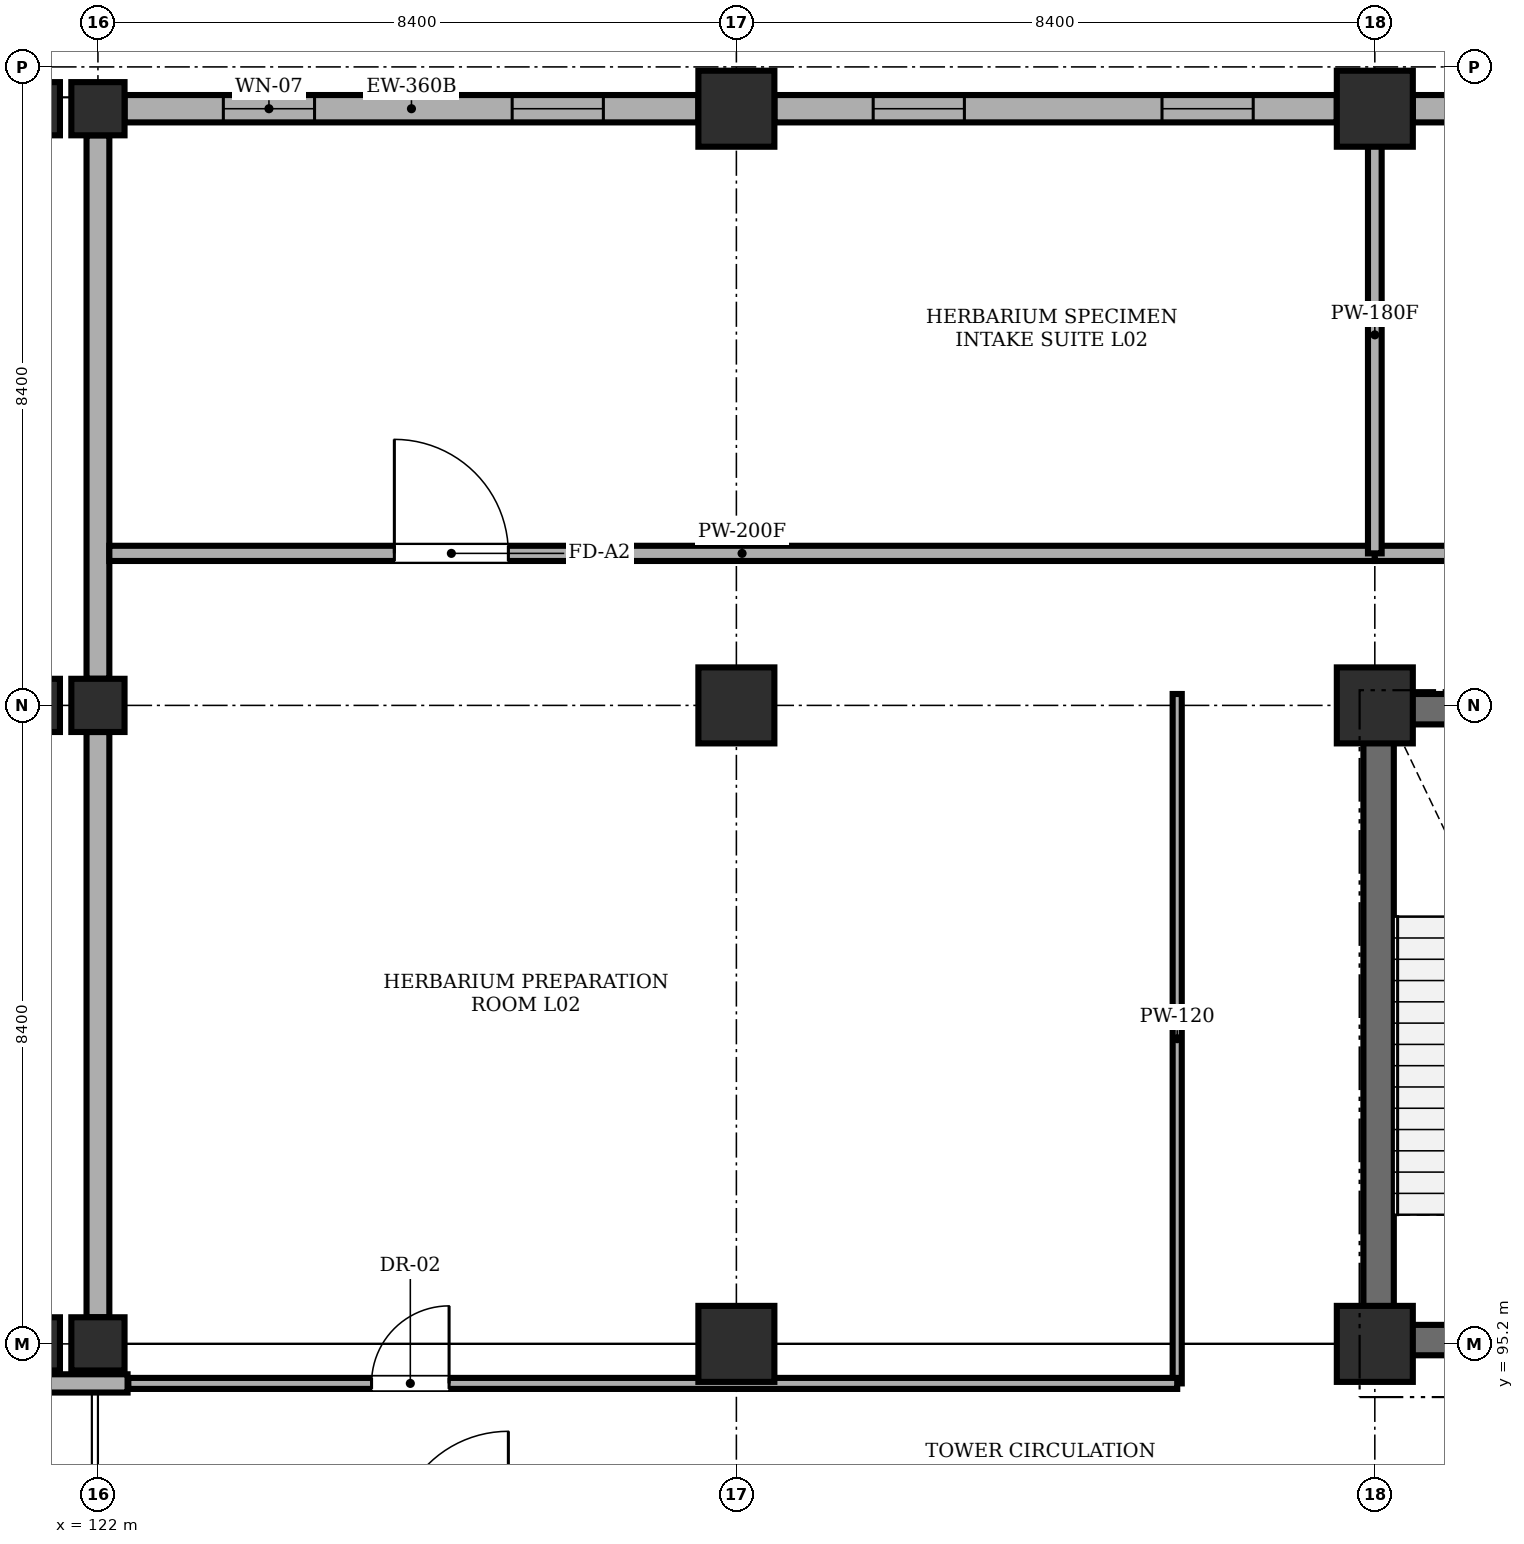
"""IFC4 building model, lengths in metres.
Left out: names, types, materials, properties, quantities, classifications, styles, units other than length and angle.
Written with IfcOpenShell. Run it as: python <this file> out.ifc"""

import sys

from ifc_helpers import new_model, si_unit, direction, frame, frame_2d, origin, origin_2d, place, context, subcontext, project, spatial, rectangle, extrude, element, fill, save


model = new_model("IFC4")
c1 = context("Model", 3, precision=1e-05, world=origin(), true_north=direction((0.0, 1.0)))
c2 = subcontext(c1, "Body", "Model", "MODEL_VIEW")
j1 = project(units=[si_unit("LENGTHUNIT", "METRE"), si_unit("PLANEANGLEUNIT", "RADIAN")], contexts=[c1])
p1 = place(None, origin())
s1 = spatial("IfcSite", under=j1, at=p1, CompositionType="ELEMENT")
p2 = place(p1, origin())
s2 = spatial("IfcBuilding", under=s1, at=p2, CompositionType="ELEMENT")
p3 = place(p2, frame((0.0, 0.0, 5.4)))
s3 = spatial("IfcBuildingStorey", under=s2, at=p3, CompositionType="ELEMENT", Elevation=5.4)
for number, where, z_axis, x_axis in (
    (1, (121.15, 95.2, 0.0), (0.0, 0.0, 1.0), (1.0, 0.0, 0.0)),
    (2, (121.15, 103.6, 0.0), (0.0, 0.0, 1.0), (1.0, 0.0, 0.0)),
    (3, (121.15, 111.45, 0.0), (0.0, 0.0, 1.0), (1.0, 0.0, 0.0)),
    (4, (122.0, 95.2, 0.0), (0.0, 0.0, 1.0), (1.0, 0.0, 0.0)),
    (5, (122.0, 103.6, 0.0), (0.0, 0.0, 1.0), (1.0, 0.0, 0.0)),
    (6, (122.0, 111.45, 0.0), (0.0, 0.0, 1.0), (1.0, 0.0, 0.0)),
):
    element("IfcColumn", number, at=place(p3, frame(where, z_axis=z_axis, x_axis=x_axis)), inside=s3, PredefinedType="COLUMN", context=c2, shape_type="SweptSolid", body=[
        extrude(rectangle(XDim=0.7, YDim=0.7, at=origin_2d()), origin(), (0.0, 0.0, 1.0), 4.58),
    ])
for number, where, z_axis, x_axis in (
    (7, (130.4, 95.2, 0.0), (0.0, 0.0, 1.0), (1.0, 0.0, 0.0)),
    (8, (130.4, 103.6, 0.0), (0.0, 0.0, 1.0), (1.0, 0.0, 0.0)),
    (9, (130.4, 111.45, 0.0), (0.0, 0.0, 1.0), (1.0, 0.0, 0.0)),
    (10, (138.8, 95.2, 0.0), (0.0, 0.0, 1.0), (1.0, 0.0, 0.0)),
    (11, (138.8, 103.6, 0.0), (0.0, 0.0, 1.0), (1.0, 0.0, 0.0)),
    (12, (138.8, 111.45, 0.0), (0.0, 0.0, 1.0), (1.0, 0.0, 0.0)),
):
    element("IfcColumn", number, at=place(p3, frame(where, z_axis=z_axis, x_axis=x_axis)), inside=s3, PredefinedType="COLUMN", context=c2, shape_type="SweptSolid", body=[
        extrude(rectangle(XDim=1.0, YDim=1.0, at=origin_2d()), origin(), (0.0, 0.0, 1.0), 4.58),
    ])
for number, where, z_axis, x_axis in (
    (13, (138.65, 95.25, 0.0), (0.0, 0.0, 1.0), (1.0, 0.0, 0.0)),
    (14, (138.65, 103.55, 0.0), (0.0, 0.0, 1.0), (1.0, 0.0, 0.0)),
):
    element("IfcWall", number, at=place(p3, frame(where, z_axis=z_axis, x_axis=x_axis)), inside=s3, PredefinedType="SHEAR", context=c2, shape_type="SweptSolid", body=[
        extrude(rectangle(XDim=3.9, YDim=0.4, at=frame_2d((1.95, 0.0))), origin(), (0.0, 0.0, 1.0), 4.58),
    ])
p4 = place(p3, frame((138.85, 95.45, 0.0), z_axis=(0.0, 0.0, 1.0), x_axis=(0.0, 1.0, 0.0)))
e15 = element("IfcWall", 15, at=p4, inside=s3, PredefinedType="SHEAR", context=c2, shape_type="SweptSolid", body=[
    extrude(rectangle(XDim=7.9, YDim=0.4, at=frame_2d((3.95, 0.0))), origin(), (0.0, 0.0, 1.0), 4.58),
])
p5 = place(p3, frame((122.35, 111.45, 0.0), z_axis=(0.0, 0.0, 1.0), x_axis=(1.0, 0.0, 0.0)))
e16 = element("IfcWall", 16, at=p5, inside=s3, PredefinedType="STANDARD", context=c2, shape_type="SweptSolid", body=[
    extrude(rectangle(XDim=7.55, YDim=0.36, at=frame_2d((3.775, 0.0))), origin(), (0.0, 0.0, 1.0), 3.83),
])
p6 = place(p5, frame((1.3, 0.0, 1.1)))
e17 = element("IfcOpeningElement", 17, at=p6, cuts=e16, PredefinedType="OPENING", context=c2, shape_type="SweptSolid", body=[
    extrude(rectangle(XDim=1.2, YDim=1.5, at=frame_2d((0.6, 0.75))), frame((0.0, 0.19, 0.0), z_axis=(0.0, -1.0, 0.0), x_axis=(1.0, 0.0, 0.0)), (0.0, 0.0, 1.0), 0.38),
])
p7 = place(p5, frame((5.1, 0.0, 1.1)))
e18 = element("IfcOpeningElement", 18, at=p7, cuts=e16, PredefinedType="OPENING", context=c2, shape_type="SweptSolid", body=[
    extrude(rectangle(XDim=1.2, YDim=1.5, at=frame_2d((0.6, 0.75))), frame((0.0, 0.19, 0.0), z_axis=(0.0, -1.0, 0.0), x_axis=(1.0, 0.0, 0.0)), (0.0, 0.0, 1.0), 0.38),
])
p8 = place(p3, frame((130.9, 111.45, 0.0), z_axis=(0.0, 0.0, 1.0), x_axis=(1.0, 0.0, 0.0)))
e19 = element("IfcWall", 19, at=p8, inside=s3, PredefinedType="STANDARD", context=c2, shape_type="SweptSolid", body=[
    extrude(rectangle(XDim=7.4, YDim=0.36, at=frame_2d((3.7, 0.0))), origin(), (0.0, 0.0, 1.0), 3.83),
])
p9 = place(p8, frame((1.3, 0.0, 1.1)))
e20 = element("IfcOpeningElement", 20, at=p9, cuts=e19, PredefinedType="OPENING", context=c2, shape_type="SweptSolid", body=[
    extrude(rectangle(XDim=1.2, YDim=1.5, at=frame_2d((0.6, 0.75))), frame((0.0, 0.19, 0.0), z_axis=(0.0, -1.0, 0.0), x_axis=(1.0, 0.0, 0.0)), (0.0, 0.0, 1.0), 0.38),
])
p10 = place(p8, frame((5.1, 0.0, 1.1)))
e21 = element("IfcOpeningElement", 21, at=p10, cuts=e19, PredefinedType="OPENING", context=c2, shape_type="SweptSolid", body=[
    extrude(rectangle(XDim=1.2, YDim=1.5, at=frame_2d((0.6, 0.75))), frame((0.0, 0.19, 0.0), z_axis=(0.0, -1.0, 0.0), x_axis=(1.0, 0.0, 0.0)), (0.0, 0.0, 1.0), 0.38),
])
p11 = place(p3, frame((139.3, 111.45, 0.0), z_axis=(0.0, 0.0, 1.0), x_axis=(1.0, 0.0, 0.0)))
e22 = element("IfcWall", 22, at=p11, inside=s3, PredefinedType="STANDARD", context=c2, shape_type="SweptSolid", body=[
    extrude(rectangle(XDim=7.4, YDim=0.36, at=frame_2d((3.7, 0.0))), origin(), (0.0, 0.0, 1.0), 3.83),
])
p12 = place(p11, frame((1.3, 0.0, 1.1)))
e23 = element("IfcOpeningElement", 23, at=p12, cuts=e22, PredefinedType="OPENING", context=c2, shape_type="SweptSolid", body=[
    extrude(rectangle(XDim=1.2, YDim=1.5, at=frame_2d((0.6, 0.75))), frame((0.0, 0.19, 0.0), z_axis=(0.0, -1.0, 0.0), x_axis=(1.0, 0.0, 0.0)), (0.0, 0.0, 1.0), 0.38),
])
p13 = place(p11, frame((5.1, 0.0, 1.1)))
e24 = element("IfcOpeningElement", 24, at=p13, cuts=e22, PredefinedType="OPENING", context=c2, shape_type="SweptSolid", body=[
    extrude(rectangle(XDim=1.2, YDim=1.5, at=frame_2d((0.6, 0.75))), frame((0.0, 0.19, 0.0), z_axis=(0.0, -1.0, 0.0), x_axis=(1.0, 0.0, 0.0)), (0.0, 0.0, 1.0), 0.38),
])
p14 = place(p3, frame((121.03, 94.68, 0.0), z_axis=(0.0, 0.0, 1.0), x_axis=(1.0, 0.0, 0.0)))
e25 = element("IfcWall", 25, at=p14, inside=s3, PredefinedType="STANDARD", context=c2, shape_type="SweptSolid", body=[
    extrude(rectangle(XDim=1.36, YDim=0.24, at=frame_2d((0.68, 0.0))), origin(), (0.0, 0.0, 1.0), 4.58),
])
p15 = place(p3, frame((122.0, 95.55, 0.0), z_axis=(0.0, 0.0, 1.0), x_axis=(0.0, 1.0, 0.0)))
e26 = element("IfcWall", 26, at=p15, inside=s3, PredefinedType="STANDARD", context=c2, shape_type="SweptSolid", body=[
    extrude(rectangle(XDim=7.7, YDim=0.3, at=frame_2d((3.85, 0.0))), origin(), (0.0, 0.0, 1.0), 3.83),
])
p16 = place(p3, frame((122.0, 103.95, 0.0), z_axis=(0.0, 0.0, 1.0), x_axis=(0.0, 1.0, 0.0)))
e27 = element("IfcWall", 27, at=p16, inside=s3, PredefinedType="STANDARD", context=c2, shape_type="SweptSolid", body=[
    extrude(rectangle(XDim=7.15, YDim=0.3, at=frame_2d((3.575, 0.0))), origin(), (0.0, 0.0, 1.0), 3.83),
])
p17 = place(p3, frame((136.2, 94.68, 0.0), z_axis=(0.0, 0.0, 1.0), x_axis=(0.0, 1.0, 0.0)))
e28 = element("IfcWall", 28, at=p17, inside=s3, PredefinedType="PARTITIONING", context=c2, shape_type="SweptSolid", body=[
    extrude(rectangle(XDim=9.07, YDim=0.12, at=frame_2d((4.535, 0.0))), origin(), (0.0, 0.0, 1.0), 4.58),
])
p18 = place(p3, frame((122.4, 94.68, 0.0), z_axis=(0.0, 0.0, 1.0), x_axis=(1.0, 0.0, 0.0)))
e29 = element("IfcWall", 29, at=p18, inside=s3, PredefinedType="PARTITIONING", context=c2, shape_type="SweptSolid", body=[
    extrude(rectangle(XDim=13.8, YDim=0.145, at=frame_2d((6.9, 0.0))), origin(), (0.0, 0.0, 1.0), 4.58),
])
p19 = place(p18, frame((3.2, 0.0, 0.0)))
e30 = element("IfcOpeningElement", 30, at=p19, cuts=e29, PredefinedType="OPENING", context=c2, shape_type="SweptSolid", body=[
    extrude(rectangle(XDim=1.02, YDim=2.15, at=frame_2d((0.51, 1.075))), frame((0.0, 0.083, 0.0), z_axis=(0.0, -1.0, 0.0), x_axis=(1.0, 0.0, 0.0)), (0.0, 0.0, 1.0), 0.165),
])
p20 = place(p3, frame((122.15, 105.6, 0.0), z_axis=(0.0, 0.0, 1.0), x_axis=(1.0, 0.0, 0.0)))
e31 = element("IfcWall", 31, at=p20, inside=s3, PredefinedType="SOLIDWALL", context=c2, shape_type="SweptSolid", body=[
    extrude(rectangle(XDim=16.65, YDim=0.2, at=frame_2d((8.325, 0.0))), origin(), (0.0, 0.0, 1.0), 4.58),
])
p21 = place(p20, frame((3.75, 0.0, 0.0)))
e32 = element("IfcOpeningElement", 32, at=p21, cuts=e31, PredefinedType="OPENING", context=c2, shape_type="SweptSolid", body=[
    extrude(rectangle(XDim=1.5, YDim=2.2, at=frame_2d((0.75, 1.1))), frame((0.0, 0.11, 0.0), z_axis=(0.0, -1.0, 0.0), x_axis=(1.0, 0.0, 0.0)), (0.0, 0.0, 1.0), 0.22),
])
p22 = place(p3, frame((138.8, 105.6, 0.0), z_axis=(0.0, 0.0, 1.0), x_axis=(1.0, 0.0, 0.0)))
e33 = element("IfcWall", 33, at=p22, inside=s3, PredefinedType="SOLIDWALL", context=c2, shape_type="SweptSolid", body=[
    extrude(rectangle(XDim=12.6, YDim=0.2, at=frame_2d((6.3, 0.0))), origin(), (0.0, 0.0, 1.0), 4.58),
])
p23 = place(p22, frame((3.4, 0.0, 0.0)))
e34 = element("IfcOpeningElement", 34, at=p23, cuts=e33, PredefinedType="OPENING", context=c2, shape_type="SweptSolid", body=[
    extrude(rectangle(XDim=1.25, YDim=2.2, at=frame_2d((0.625, 1.1))), frame((0.0, 0.11, 0.0), z_axis=(0.0, -1.0, 0.0), x_axis=(1.0, 0.0, 0.0)), (0.0, 0.0, 1.0), 0.22),
])
p24 = place(p3, frame((138.8, 105.6, 0.0), z_axis=(0.0, 0.0, 1.0), x_axis=(0.0, 1.0, 0.0)))
e35 = element("IfcWall", 35, at=p24, inside=s3, PredefinedType="STANDARD", context=c2, shape_type="SweptSolid", body=[
    extrude(rectangle(XDim=5.75, YDim=0.18, at=frame_2d((2.875, 0.0))), origin(), (0.0, 0.0, 1.0), 3.83),
])
p25 = place(p6, origin())
e36 = element("IfcWindow", 36, at=p25, inside=s3, PartitioningType="SINGLE_PANEL", PredefinedType="WINDOW", context=c2, shape_type="SweptSolid", body=[
    extrude(rectangle(XDim=1.2, YDim=1.5, at=frame_2d((0.6, 0.75))), frame((0.0, 0.03, 0.0), z_axis=(0.0, -1.0, 0.0), x_axis=(1.0, 0.0, 0.0)), (0.0, 0.0, 1.0), 0.06),
])
fill(e17, e36)
p26 = place(p7, origin())
e37 = element("IfcWindow", 37, at=p26, inside=s3, PartitioningType="SINGLE_PANEL", PredefinedType="WINDOW", context=c2, shape_type="SweptSolid", body=[
    extrude(rectangle(XDim=1.2, YDim=1.5, at=frame_2d((0.6, 0.75))), frame((0.0, 0.03, 0.0), z_axis=(0.0, -1.0, 0.0), x_axis=(1.0, 0.0, 0.0)), (0.0, 0.0, 1.0), 0.06),
])
fill(e18, e37)
p27 = place(p9, origin())
e38 = element("IfcWindow", 38, at=p27, inside=s3, PartitioningType="SINGLE_PANEL", PredefinedType="WINDOW", context=c2, shape_type="SweptSolid", body=[
    extrude(rectangle(XDim=1.2, YDim=1.5, at=frame_2d((0.6, 0.75))), frame((0.0, 0.03, 0.0), z_axis=(0.0, -1.0, 0.0), x_axis=(1.0, 0.0, 0.0)), (0.0, 0.0, 1.0), 0.06),
])
fill(e20, e38)
p28 = place(p10, origin())
e39 = element("IfcWindow", 39, at=p28, inside=s3, PartitioningType="SINGLE_PANEL", PredefinedType="WINDOW", context=c2, shape_type="SweptSolid", body=[
    extrude(rectangle(XDim=1.2, YDim=1.5, at=frame_2d((0.6, 0.75))), frame((0.0, 0.03, 0.0), z_axis=(0.0, -1.0, 0.0), x_axis=(1.0, 0.0, 0.0)), (0.0, 0.0, 1.0), 0.06),
])
fill(e21, e39)
p29 = place(p19, origin())
e40 = element("IfcDoor", 40, at=p29, inside=s3, OperationType="SINGLE_SWING_RIGHT", PredefinedType="DOOR", context=c2, shape_type="SweptSolid", body=[
    extrude(rectangle(XDim=1.02, YDim=2.15, at=frame_2d((0.51, 1.075))), frame((0.0, 0.025, 0.0), z_axis=(0.0, -1.0, 0.0), x_axis=(1.0, 0.0, 0.0)), (0.0, 0.0, 1.0), 0.05),
])
fill(e30, e40)
p30 = place(p21, origin())
e41 = element("IfcDoor", 41, at=p30, inside=s3, OperationType="SINGLE_SWING_LEFT", PredefinedType="DOOR", context=c2, shape_type="SweptSolid", body=[
    extrude(rectangle(XDim=1.5, YDim=2.2, at=frame_2d((0.75, 1.1))), frame((0.0, 0.025, 0.0), z_axis=(0.0, -1.0, 0.0), x_axis=(1.0, 0.0, 0.0)), (0.0, 0.0, 1.0), 0.05),
])
fill(e32, e41)
save(model, sys.argv[1])
